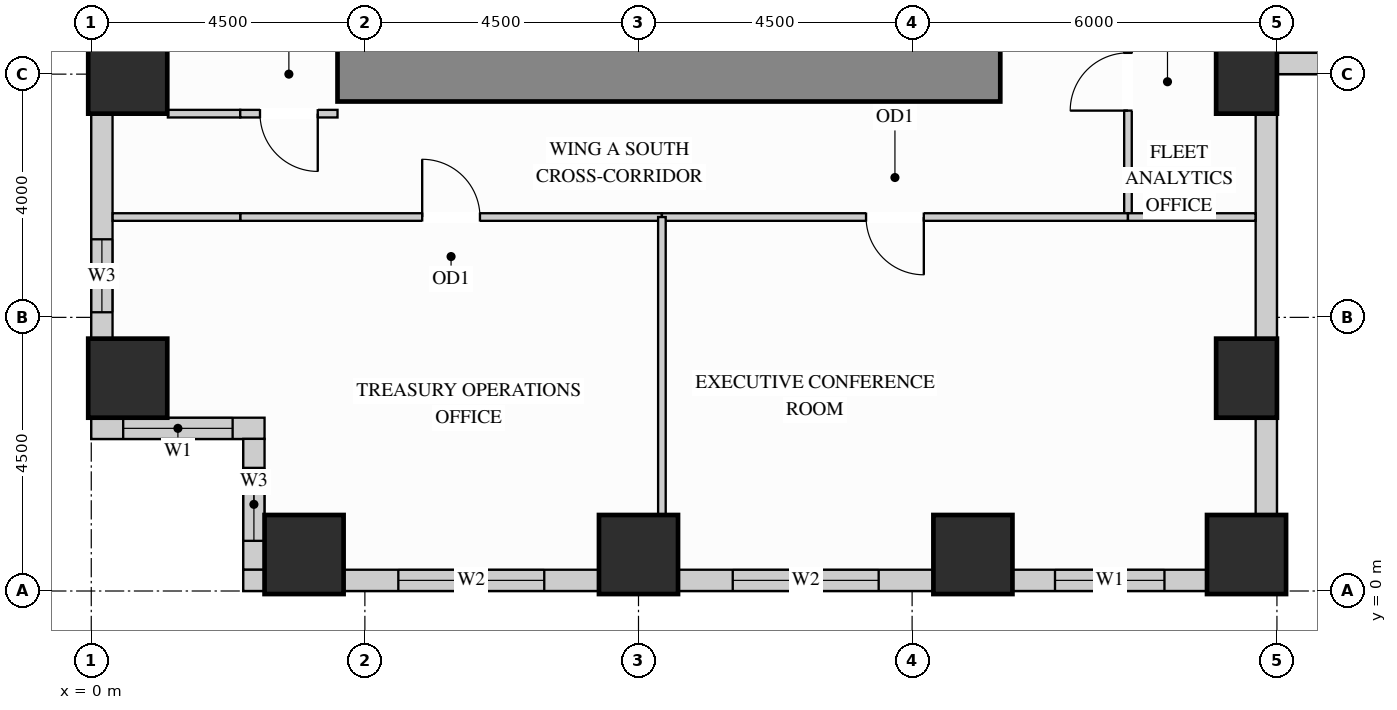
"""IFC4 building model, lengths in metres.
Left out: names, types, materials, properties, quantities, classifications, styles, units other than length and angle.
Written with IfcOpenShell. Run it as: python <this file> out.ifc"""

import sys

from ifc_helpers import new_model, si_unit, direction, frame, frame_2d, origin, origin_2d, place, context, subcontext, project, spatial, rectangle, extrude, source, transform, mapped, element, fill, save


model = new_model("IFC4")
c1 = context("Model", 3, precision=1e-05, world=origin(), true_north=direction((0.0, 1.0)))
c2 = subcontext(c1, "Body", "Model", "MODEL_VIEW")
j1 = project(units=[si_unit("LENGTHUNIT", "METRE"), si_unit("PLANEANGLEUNIT", "RADIAN")], contexts=[c1])
p1 = place(None, origin())
s1 = spatial("IfcSite", under=j1, at=p1, CompositionType="ELEMENT")
p2 = place(p1, origin())
s2 = spatial("IfcBuilding", under=s1, at=p2, CompositionType="ELEMENT")
p3 = place(p2, frame((0.0, 0.0, 62.1)))
s3 = spatial("IfcBuildingStorey", under=s2, at=p3, CompositionType="ELEMENT", Elevation=62.1)
m1 = source(origin(), c2, "Body", "SweptSolid", [
    extrude(rectangle(XDim=1.0, YDim=1.3, at=origin_2d()), origin(), (0.0, 0.0, 1.0), 3.38),
])
for number, where, z_axis, x_axis in (
    (1, (19.0, 3.5, 0.0), (0.0, 0.0, 1.0), (1.0, 0.0, 0.0)),
    (2, (19.0, 8.5, 0.0), (0.0, 0.0, 1.0), (1.0, 0.0, 0.0)),
):
    element("IfcColumn", number, at=place(p3, frame(where, z_axis=z_axis, x_axis=x_axis)), inside=s3, PredefinedType="COLUMN", context=c2, shape_type="MappedRepresentation", body=[
        mapped(m1, transform((0.0, 0.0, 0.0), x_axis=(1.0, 0.0, 0.0), y_axis=(0.0, 1.0, 0.0), z_axis=(0.0, 0.0, 1.0))),
    ])
m2 = source(origin(), c2, "Body", "SweptSolid", [
    extrude(rectangle(XDim=1.3, YDim=1.3, at=origin_2d()), origin(), (0.0, 0.0, 1.0), 3.38),
])
for number, where, z_axis, x_axis in (
    (3, (14.5, 0.6, 0.0), (0.0, 0.0, 1.0), (1.0, 0.0, 0.0)),
    (4, (19.0, 0.6, 0.0), (0.0, 0.0, 1.0), (1.0, 0.0, 0.0)),
    (5, (3.5, 0.6, 0.0), (0.0, 0.0, 1.0), (1.0, 0.0, 0.0)),
    (6, (9.0, 0.6, 0.0), (0.0, 0.0, 1.0), (1.0, 0.0, 0.0)),
    (7, (0.6, 3.5, 0.0), (0.0, 0.0, 1.0), (1.0, 0.0, 0.0)),
    (8, (0.6, 8.5, 0.0), (0.0, 0.0, 1.0), (1.0, 0.0, 0.0)),
):
    element("IfcColumn", number, at=place(p3, frame(where, z_axis=z_axis, x_axis=x_axis)), inside=s3, PredefinedType="COLUMN", context=c2, shape_type="MappedRepresentation", body=[
        mapped(m2, transform((0.0, 0.0, 0.0), x_axis=(1.0, 0.0, 0.0), y_axis=(0.0, 1.0, 0.0), z_axis=(0.0, 0.0, 1.0))),
    ])
m3 = source(origin(), c2, "Body", "SweptSolid", [
    extrude(rectangle(XDim=10.9, YDim=0.9, at=frame_2d((5.45, 0.0))), origin(), (0.0, 0.0, 1.0), 3.38),
])
p4 = place(p3, frame((4.05, 8.5, 0.0), z_axis=(0.0, 0.0, 1.0), x_axis=(1.0, 0.0, 0.0)))
e9 = element("IfcWall", 9, at=p4, inside=s3, PredefinedType="SHEAR", context=c2, shape_type="MappedRepresentation", body=[
    mapped(m3, transform((0.0, 0.0, 0.0), x_axis=(1.0, 0.0, 0.0), y_axis=(0.0, 1.0, 0.0), z_axis=(0.0, 0.0, 1.0))),
])
p5 = place(p3, frame((0.175, 7.852, 0.0), z_axis=(0.0, 0.0, 1.0), x_axis=(0.0, -1.0, 0.0)))
e10 = element("IfcWall", 10, at=p5, inside=s3, PredefinedType="SOLIDWALL", context=c2, shape_type="SweptSolid", body=[
    extrude(rectangle(XDim=3.704, YDim=0.35, at=frame_2d((1.852, 0.0))), origin(), (0.0, 0.0, 1.0), 2.51),
])
p6 = place(p5, frame((2.068, 0.0, 0.78)))
e11 = element("IfcOpeningElement", 11, at=p6, cuts=e10, PredefinedType="OPENING", context=c2, shape_type="SweptSolid", body=[
    extrude(rectangle(XDim=1.2, YDim=1.55, at=frame_2d((0.6, 0.775))), frame((0.0, 0.185, 0.0), z_axis=(0.0, -1.0, 0.0), x_axis=(1.0, 0.0, 0.0)), (0.0, 0.0, 1.0), 0.37),
])
p7 = place(p3, frame((0.0, 2.675, 0.0), z_axis=(0.0, 0.0, 1.0), x_axis=(1.0, 0.0, 0.0)))
e12 = element("IfcWall", 12, at=p7, inside=s3, PredefinedType="SOLIDWALL", context=c2, shape_type="SweptSolid", body=[
    extrude(rectangle(XDim=2.85, YDim=0.35, at=frame_2d((1.425, 0.0))), origin(), (0.0, 0.0, 1.0), 3.365),
])
p8 = place(p7, frame((0.525, 0.0, 0.78)))
e13 = element("IfcOpeningElement", 13, at=p8, cuts=e12, PredefinedType="OPENING", context=c2, shape_type="SweptSolid", body=[
    extrude(rectangle(XDim=1.8, YDim=2.1, at=frame_2d((0.9, 1.05))), frame((0.0, 0.185, 0.0), z_axis=(0.0, -1.0, 0.0), x_axis=(1.0, 0.0, 0.0)), (0.0, 0.0, 1.0), 0.37),
])
p9 = place(p3, frame((2.675, 2.502, 0.0), z_axis=(0.0, 0.0, 1.0), x_axis=(0.0, -1.0, 0.0)))
e14 = element("IfcWall", 14, at=p9, inside=s3, PredefinedType="SOLIDWALL", context=c2, shape_type="SweptSolid", body=[
    extrude(rectangle(XDim=2.154, YDim=0.35, at=frame_2d((1.077, 0.0))), origin(), (0.0, 0.0, 1.0), 3.365),
])
p10 = place(p9, frame((0.477, 0.0, 0.78)))
e15 = element("IfcOpeningElement", 15, at=p10, cuts=e14, PredefinedType="OPENING", context=c2, shape_type="SweptSolid", body=[
    extrude(rectangle(XDim=1.2, YDim=2.1, at=frame_2d((0.6, 1.05))), frame((0.0, 0.185, 0.0), z_axis=(0.0, -1.0, 0.0), x_axis=(1.0, 0.0, 0.0)), (0.0, 0.0, 1.0), 0.37),
])
m4 = source(origin(), c2, "Body", "SweptSolid", [
    extrude(rectangle(XDim=0.352, YDim=0.35, at=frame_2d((0.176, 0.0))), origin(), (0.0, 0.0, 1.0), 3.365),
])
p11 = place(p3, frame((2.5, 0.175, 0.0), z_axis=(0.0, 0.0, 1.0), x_axis=(1.0, 0.0, 0.0)))
e16 = element("IfcWall", 16, at=p11, inside=s3, PredefinedType="SOLIDWALL", context=c2, shape_type="MappedRepresentation", body=[
    mapped(m4, transform((0.0, 0.0, 0.0), x_axis=(1.0, 0.0, 0.0), y_axis=(0.0, 1.0, 0.0), z_axis=(0.0, 0.0, 1.0))),
])
p12 = place(p3, frame((4.148, 0.175, 0.0), z_axis=(0.0, 0.0, 1.0), x_axis=(1.0, 0.0, 0.0)))
e17 = element("IfcWall", 17, at=p12, inside=s3, PredefinedType="SOLIDWALL", context=c2, shape_type="SweptSolid", body=[
    extrude(rectangle(XDim=4.204, YDim=0.35, at=frame_2d((2.102, 0.0))), origin(), (0.0, 0.0, 1.0), 2.51),
])
p13 = place(p12, frame((0.902, 0.0, 0.78)))
e18 = element("IfcOpeningElement", 18, at=p13, cuts=e17, PredefinedType="OPENING", context=c2, shape_type="SweptSolid", body=[
    extrude(rectangle(XDim=2.4, YDim=1.55, at=frame_2d((1.2, 0.775))), frame((0.0, 0.185, 0.0), z_axis=(0.0, -1.0, 0.0), x_axis=(1.0, 0.0, 0.0)), (0.0, 0.0, 1.0), 0.37),
])
p14 = place(p3, frame((9.648, 0.175, 0.0), z_axis=(0.0, 0.0, 1.0), x_axis=(1.0, 0.0, 0.0)))
e19 = element("IfcWall", 19, at=p14, inside=s3, PredefinedType="SOLIDWALL", context=c2, shape_type="SweptSolid", body=[
    extrude(rectangle(XDim=4.204, YDim=0.35, at=frame_2d((2.102, 0.0))), origin(), (0.0, 0.0, 1.0), 2.51),
])
p15 = place(p14, frame((0.902, 0.0, 0.78)))
e20 = element("IfcOpeningElement", 20, at=p15, cuts=e19, PredefinedType="OPENING", context=c2, shape_type="SweptSolid", body=[
    extrude(rectangle(XDim=2.4, YDim=1.55, at=frame_2d((1.2, 0.775))), frame((0.0, 0.185, 0.0), z_axis=(0.0, -1.0, 0.0), x_axis=(1.0, 0.0, 0.0)), (0.0, 0.0, 1.0), 0.37),
])
p16 = place(p3, frame((15.148, 0.175, 0.0), z_axis=(0.0, 0.0, 1.0), x_axis=(1.0, 0.0, 0.0)))
e21 = element("IfcWall", 21, at=p16, inside=s3, PredefinedType="SOLIDWALL", context=c2, shape_type="SweptSolid", body=[
    extrude(rectangle(XDim=3.204, YDim=0.35, at=frame_2d((1.602, 0.0))), origin(), (0.0, 0.0, 1.0), 2.51),
])
p17 = place(p16, frame((0.702, 0.0, 0.78)))
e22 = element("IfcOpeningElement", 22, at=p17, cuts=e21, PredefinedType="OPENING", context=c2, shape_type="SweptSolid", body=[
    extrude(rectangle(XDim=1.8, YDim=1.55, at=frame_2d((0.9, 0.775))), frame((0.0, 0.185, 0.0), z_axis=(0.0, -1.0, 0.0), x_axis=(1.0, 0.0, 0.0)), (0.0, 0.0, 1.0), 0.37),
])
m5 = source(origin(), c2, "Body", "SweptSolid", [
    extrude(rectangle(XDim=1.604, YDim=0.35, at=frame_2d((0.802, 0.0))), origin(), (0.0, 0.0, 1.0), 2.51),
])
p18 = place(p3, frame((19.325, 1.248, 0.0), z_axis=(0.0, 0.0, 1.0), x_axis=(0.0, 1.0, 0.0)))
e23 = element("IfcWall", 23, at=p18, inside=s3, PredefinedType="SOLIDWALL", context=c2, shape_type="MappedRepresentation", body=[
    mapped(m5, transform((0.0, 0.0, 0.0), x_axis=(1.0, 0.0, 0.0), y_axis=(0.0, 1.0, 0.0), z_axis=(0.0, 0.0, 1.0))),
])
m6 = source(origin(), c2, "Body", "SweptSolid", [
    extrude(rectangle(XDim=3.704, YDim=0.35, at=frame_2d((1.852, 0.0))), origin(), (0.0, 0.0, 1.0), 2.51),
])
p19 = place(p3, frame((19.325, 4.148, 0.0), z_axis=(0.0, 0.0, 1.0), x_axis=(0.0, 1.0, 0.0)))
e24 = element("IfcWall", 24, at=p19, inside=s3, PredefinedType="SOLIDWALL", context=c2, shape_type="MappedRepresentation", body=[
    mapped(m6, transform((0.0, 0.0, 0.0), x_axis=(1.0, 0.0, 0.0), y_axis=(0.0, 1.0, 0.0), z_axis=(0.0, 0.0, 1.0))),
])
p20 = place(p3, frame((19.498, 8.675, 0.0), z_axis=(0.0, 0.0, 1.0), x_axis=(1.0, 0.0, 0.0)))
e25 = element("IfcWall", 25, at=p20, inside=s3, PredefinedType="SOLIDWALL", context=c2, shape_type="SweptSolid", body=[
    extrude(rectangle(XDim=3.404, YDim=0.35, at=frame_2d((1.702, 0.0))), origin(), (0.0, 0.0, 1.0), 3.365),
])
p21 = place(p20, frame((0.952, 0.0, 0.78)))
e26 = element("IfcOpeningElement", 26, at=p21, cuts=e25, PredefinedType="OPENING", context=c2, shape_type="SweptSolid", body=[
    extrude(rectangle(XDim=1.5, YDim=2.0, at=frame_2d((0.75, 1.0))), frame((0.0, 0.185, 0.0), z_axis=(0.0, -1.0, 0.0), x_axis=(1.0, 0.0, 0.0)), (0.0, 0.0, 1.0), 0.37),
])
p22 = place(p3, frame((17.05, 6.15, 0.0), z_axis=(0.0, 0.0, 1.0), x_axis=(0.0, 1.0, 0.0)))
e27 = element("IfcWall", 27, at=p22, inside=s3, PredefinedType="PARTITIONING", context=c2, shape_type="SweptSolid", body=[
    extrude(rectangle(XDim=4.45, YDim=0.125, at=frame_2d((2.225, 0.0))), origin(), (0.0, 0.0, 1.0), 3.365),
])
p23 = place(p22, frame((1.75, 0.0, 0.0)))
e28 = element("IfcOpeningElement", 28, at=p23, cuts=e27, PredefinedType="OPENING", context=c2, shape_type="SweptSolid", body=[
    extrude(rectangle(XDim=0.95, YDim=2.15, at=frame_2d((0.475, 1.075))), frame((0.0, 0.073, 0.0), z_axis=(0.0, -1.0, 0.0), x_axis=(1.0, 0.0, 0.0)), (0.0, 0.0, 1.0), 0.145),
])
m7 = source(origin(), c2, "Body", "SweptSolid", [
    extrude(rectangle(XDim=1.19, YDim=0.125, at=frame_2d((0.595, 0.0))), origin(), (0.0, 0.0, 1.0), 3.365),
])
p24 = place(p3, frame((1.26, 7.85, 0.0), z_axis=(0.0, 0.0, 1.0), x_axis=(1.0, 0.0, 0.0)))
e29 = element("IfcWall", 29, at=p24, inside=s3, PredefinedType="PARTITIONING", context=c2, shape_type="MappedRepresentation", body=[
    mapped(m7, transform((0.0, 0.0, 0.0), x_axis=(1.0, 0.0, 0.0), y_axis=(0.0, 1.0, 0.0), z_axis=(0.0, 0.0, 1.0))),
])
p25 = place(p3, frame((2.45, 7.85, 0.0), z_axis=(0.0, 0.0, 1.0), x_axis=(1.0, 0.0, 0.0)))
e30 = element("IfcWall", 30, at=p25, inside=s3, PredefinedType="PARTITIONING", context=c2, shape_type="SweptSolid", body=[
    extrude(rectangle(XDim=1.6, YDim=0.125, at=frame_2d((0.8, 0.0))), origin(), (0.0, 0.0, 1.0), 3.365),
])
p26 = place(p25, frame((0.325, 0.0, 0.0)))
e31 = element("IfcOpeningElement", 31, at=p26, cuts=e30, PredefinedType="OPENING", context=c2, shape_type="SweptSolid", body=[
    extrude(rectangle(XDim=0.95, YDim=2.15, at=frame_2d((0.475, 1.075))), frame((0.0, 0.073, 0.0), z_axis=(0.0, -1.0, 0.0), x_axis=(1.0, 0.0, 0.0)), (0.0, 0.0, 1.0), 0.145),
])
p27 = place(p3, frame((2.45, 6.15, 0.0), z_axis=(0.0, 0.0, 1.0), x_axis=(1.0, 0.0, 0.0)))
e32 = element("IfcWall", 32, at=p27, inside=s3, PredefinedType="PARTITIONING", context=c2, shape_type="SweptSolid", body=[
    extrude(rectangle(XDim=6.935, YDim=0.125, at=frame_2d((3.468, 0.0))), origin(), (0.0, 0.0, 1.0), 3.365),
])
p28 = place(p27, frame((2.992, 0.0, 0.0)))
e33 = element("IfcOpeningElement", 33, at=p28, cuts=e32, PredefinedType="OPENING", context=c2, shape_type="SweptSolid", body=[
    extrude(rectangle(XDim=0.95, YDim=2.15, at=frame_2d((0.475, 1.075))), frame((0.0, 0.073, 0.0), z_axis=(0.0, -1.0, 0.0), x_axis=(1.0, 0.0, 0.0)), (0.0, 0.0, 1.0), 0.145),
])
p29 = place(p3, frame((9.385, 6.15, 0.0), z_axis=(0.0, 0.0, 1.0), x_axis=(1.0, 0.0, 0.0)))
e34 = element("IfcWall", 34, at=p29, inside=s3, PredefinedType="PARTITIONING", context=c2, shape_type="SweptSolid", body=[
    extrude(rectangle(XDim=7.665, YDim=0.125, at=frame_2d((3.833, 0.0))), origin(), (0.0, 0.0, 1.0), 3.365),
])
p30 = place(p29, frame((3.357, 0.0, 0.0)))
e35 = element("IfcOpeningElement", 35, at=p30, cuts=e34, PredefinedType="OPENING", context=c2, shape_type="SweptSolid", body=[
    extrude(rectangle(XDim=0.95, YDim=2.15, at=frame_2d((0.475, 1.075))), frame((0.0, 0.073, 0.0), z_axis=(0.0, -1.0, 0.0), x_axis=(1.0, 0.0, 0.0)), (0.0, 0.0, 1.0), 0.145),
])
m8 = source(origin(), c2, "Body", "SweptSolid", [
    extrude(rectangle(XDim=2.098, YDim=0.125, at=frame_2d((1.049, 0.0))), origin(), (0.0, 0.0, 1.0), 3.365),
])
for number, where, z_axis, x_axis in (
    (36, (0.352, 6.15, 0.0), (0.0, 0.0, 1.0), (1.0, 0.0, 0.0)),
    (37, (17.05, 6.15, 0.0), (0.0, 0.0, 1.0), (1.0, 0.0, 0.0)),
):
    element("IfcWall", number, at=place(p3, frame(where, z_axis=z_axis, x_axis=x_axis)), inside=s3, PredefinedType="PARTITIONING", context=c2, shape_type="MappedRepresentation", body=[
        mapped(m8, transform((0.0, 0.0, 0.0), x_axis=(1.0, 0.0, 0.0), y_axis=(0.0, 1.0, 0.0), z_axis=(0.0, 0.0, 1.0))),
    ])
m9 = source(origin(), c2, "Body", "SweptSolid", [
    extrude(rectangle(XDim=4.89, YDim=0.125, at=frame_2d((2.445, 0.0))), origin(), (0.0, 0.0, 1.0), 3.365),
])
p31 = place(p3, frame((9.385, 1.26, 0.0), z_axis=(0.0, 0.0, 1.0), x_axis=(0.0, 1.0, 0.0)))
e38 = element("IfcWall", 38, at=p31, inside=s3, PredefinedType="PARTITIONING", context=c2, shape_type="MappedRepresentation", body=[
    mapped(m9, transform((0.0, 0.0, 0.0), x_axis=(1.0, 0.0, 0.0), y_axis=(0.0, 1.0, 0.0), z_axis=(0.0, 0.0, 1.0))),
])
m10 = source(origin(), c2, "Body", "SweptSolid", [
    extrude(rectangle(XDim=0.95, YDim=2.15, at=frame_2d((0.475, 1.075))), frame((0.0, 0.025, 0.0), z_axis=(0.0, -1.0, 0.0), x_axis=(1.0, 0.0, 0.0)), (0.0, 0.0, 1.0), 0.05),
])
p32 = place(p23, origin())
e39 = element("IfcDoor", 39, at=p32, inside=s3, OperationType="SINGLE_SWING_LEFT", PredefinedType="DOOR", context=c2, shape_type="MappedRepresentation", body=[
    mapped(m10, transform((0.0, 0.0, 0.0), x_axis=(1.0, 0.0, 0.0), y_axis=(0.0, 1.0, 0.0), z_axis=(0.0, 0.0, 1.0))),
])
fill(e28, e39)
p33 = place(p28, origin())
e40 = element("IfcDoor", 40, at=p33, inside=s3, OperationType="SINGLE_SWING_LEFT", PredefinedType="DOOR", context=c2, shape_type="MappedRepresentation", body=[
    mapped(m10, transform((0.0, 0.0, 0.0), x_axis=(1.0, 0.0, 0.0), y_axis=(0.0, 1.0, 0.0), z_axis=(0.0, 0.0, 1.0))),
])
fill(e33, e40)
p34 = place(p30, origin())
e41 = element("IfcDoor", 41, at=p34, inside=s3, OperationType="SINGLE_SWING_RIGHT", PredefinedType="DOOR", context=c2, shape_type="MappedRepresentation", body=[
    mapped(m10, transform((0.0, 0.0, 0.0), x_axis=(1.0, 0.0, 0.0), y_axis=(0.0, 1.0, 0.0), z_axis=(0.0, 0.0, 1.0))),
])
fill(e35, e41)
p35 = place(p26, origin())
e42 = element("IfcDoor", 42, at=p35, inside=s3, OperationType="SINGLE_SWING_RIGHT", PredefinedType="DOOR", context=c2, shape_type="MappedRepresentation", body=[
    mapped(m10, transform((0.0, 0.0, 0.0), x_axis=(1.0, 0.0, 0.0), y_axis=(0.0, 1.0, 0.0), z_axis=(0.0, 0.0, 1.0))),
])
fill(e31, e42)
m11 = source(origin(), c2, "Body", "SweptSolid", [
    extrude(rectangle(XDim=1.8, YDim=2.1, at=frame_2d((0.9, 1.05))), frame((0.0, 0.03, 0.0), z_axis=(0.0, -1.0, 0.0), x_axis=(1.0, 0.0, 0.0)), (0.0, 0.0, 1.0), 0.06),
])
p36 = place(p8, origin())
e43 = element("IfcWindow", 43, at=p36, inside=s3, PartitioningType="SINGLE_PANEL", PredefinedType="WINDOW", context=c2, shape_type="MappedRepresentation", body=[
    mapped(m11, transform((0.0, 0.0, 0.0), x_axis=(1.0, 0.0, 0.0), y_axis=(0.0, 1.0, 0.0), z_axis=(0.0, 0.0, 1.0))),
])
fill(e13, e43)
m12 = source(origin(), c2, "Body", "SweptSolid", [
    extrude(rectangle(XDim=1.8, YDim=1.55, at=frame_2d((0.9, 0.775))), frame((0.0, 0.03, 0.0), z_axis=(0.0, -1.0, 0.0), x_axis=(1.0, 0.0, 0.0)), (0.0, 0.0, 1.0), 0.06),
])
p37 = place(p17, origin())
e44 = element("IfcWindow", 44, at=p37, inside=s3, PartitioningType="SINGLE_PANEL", PredefinedType="WINDOW", context=c2, shape_type="MappedRepresentation", body=[
    mapped(m12, transform((0.0, 0.0, 0.0), x_axis=(1.0, 0.0, 0.0), y_axis=(0.0, 1.0, 0.0), z_axis=(0.0, 0.0, 1.0))),
])
fill(e22, e44)
m13 = source(origin(), c2, "Body", "SweptSolid", [
    extrude(rectangle(XDim=2.4, YDim=1.55, at=frame_2d((1.2, 0.775))), frame((0.0, 0.03, 0.0), z_axis=(0.0, -1.0, 0.0), x_axis=(1.0, 0.0, 0.0)), (0.0, 0.0, 1.0), 0.06),
])
p38 = place(p13, origin())
e45 = element("IfcWindow", 45, at=p38, inside=s3, PartitioningType="SINGLE_PANEL", PredefinedType="WINDOW", context=c2, shape_type="MappedRepresentation", body=[
    mapped(m13, transform((0.0, 0.0, 0.0), x_axis=(1.0, 0.0, 0.0), y_axis=(0.0, 1.0, 0.0), z_axis=(0.0, 0.0, 1.0))),
])
fill(e18, e45)
p39 = place(p15, origin())
e46 = element("IfcWindow", 46, at=p39, inside=s3, PartitioningType="SINGLE_PANEL", PredefinedType="WINDOW", context=c2, shape_type="MappedRepresentation", body=[
    mapped(m13, transform((0.0, 0.0, 0.0), x_axis=(1.0, 0.0, 0.0), y_axis=(0.0, 1.0, 0.0), z_axis=(0.0, 0.0, 1.0))),
])
fill(e20, e46)
m14 = source(origin(), c2, "Body", "SweptSolid", [
    extrude(rectangle(XDim=1.2, YDim=1.55, at=frame_2d((0.6, 0.775))), frame((0.0, 0.03, 0.0), z_axis=(0.0, -1.0, 0.0), x_axis=(1.0, 0.0, 0.0)), (0.0, 0.0, 1.0), 0.06),
])
p40 = place(p6, origin())
e47 = element("IfcWindow", 47, at=p40, inside=s3, PartitioningType="SINGLE_PANEL", PredefinedType="WINDOW", context=c2, shape_type="MappedRepresentation", body=[
    mapped(m14, transform((0.0, 0.0, 0.0), x_axis=(1.0, 0.0, 0.0), y_axis=(0.0, 1.0, 0.0), z_axis=(0.0, 0.0, 1.0))),
])
fill(e11, e47)
m15 = source(origin(), c2, "Body", "SweptSolid", [
    extrude(rectangle(XDim=1.2, YDim=2.1, at=frame_2d((0.6, 1.05))), frame((0.0, 0.03, 0.0), z_axis=(0.0, -1.0, 0.0), x_axis=(1.0, 0.0, 0.0)), (0.0, 0.0, 1.0), 0.06),
])
p41 = place(p10, origin())
e48 = element("IfcWindow", 48, at=p41, inside=s3, PartitioningType="SINGLE_PANEL", PredefinedType="WINDOW", context=c2, shape_type="MappedRepresentation", body=[
    mapped(m15, transform((0.0, 0.0, 0.0), x_axis=(1.0, 0.0, 0.0), y_axis=(0.0, 1.0, 0.0), z_axis=(0.0, 0.0, 1.0))),
])
fill(e15, e48)
save(model, sys.argv[1])
